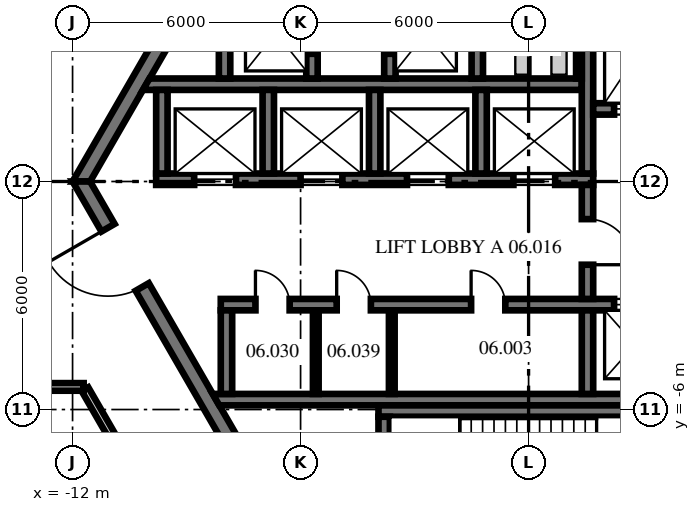
"""IFC4 building model, lengths in metres.
Left out: names, types, materials, properties, quantities, classifications, styles, units other than length and angle.
Written with IfcOpenShell. Run it as: python <this file> out.ifc"""

import sys

from ifc_helpers import new_model, si_unit, direction, frame, frame_2d, origin, place, context, subcontext, project, spatial, polyline, rectangle, outline, extrude, source, transform, mapped, element, fill, save


model = new_model("IFC4")
c1 = context("Model", 3, precision=1e-05, world=origin(), true_north=direction((0.0, 1.0)))
c2 = subcontext(c1, "Body", "Model", "MODEL_VIEW")
j1 = project(units=[si_unit("LENGTHUNIT", "METRE"), si_unit("PLANEANGLEUNIT", "RADIAN")], contexts=[c1])
p1 = place(None, origin())
s1 = spatial("IfcSite", under=j1, at=p1, CompositionType="ELEMENT")
p2 = place(p1, origin())
s2 = spatial("IfcBuilding", under=s1, at=p2, CompositionType="ELEMENT")
p3 = place(p2, frame((0.0, 0.0, 28.9)))
s3 = spatial("IfcBuildingStorey", under=s2, at=p3, CompositionType="ELEMENT", Elevation=28.9)
m1 = source(origin(), c2, "Body", "SweptSolid", [
    extrude(outline(polyline([(-0.115, -0.2), (11.885, -0.2), (11.654, 0.2), (0.115, 0.2), (-0.115, -0.2)])), origin(), (0.0, 0.0, 1.0), 4.1),
])
p4 = place(p3, frame((-5.885, 10.192, 0.0), z_axis=(0.0, 0.0, 1.0), x_axis=(-0.499996592174, -0.866027371285, 0.0)))
e1 = element("IfcWall", 1, at=p4, inside=s3, PredefinedType="SHEAR", context=c2, shape_type="MappedRepresentation", body=[
    mapped(m1, transform((0.0, 0.0, 0.0), scale=1.0)),
])
p5 = place(p4, frame((3.185, 0.0, 0.0)))
e2 = element("IfcOpeningElement", 2, at=p5, cuts=e1, PredefinedType="OPENING", context=c2, shape_type="SweptSolid", body=[
    extrude(rectangle(XDim=1.2, YDim=2.1, at=frame_2d((0.6, 1.05))), frame((0.0, 0.21, 0.0), z_axis=(0.0, -1.0, 0.0), x_axis=(1.0, 0.0, 0.0)), (0.0, 0.0, 1.0), 0.42),
])
p6 = place(p3, frame((-11.769, 0.0, 0.0), z_axis=(0.0, 0.0, 1.0), x_axis=(0.499996592174, -0.866027371285, 0.0)))
e3 = element("IfcWall", 3, at=p6, inside=s3, PredefinedType="SHEAR", context=c2, shape_type="MappedRepresentation", body=[
    mapped(m1, transform((0.0, 0.0, 0.0), scale=1.0)),
])
p7 = place(p6, frame((1.405, 0.0, 0.0)))
e4 = element("IfcOpeningElement", 4, at=p7, cuts=e3, PredefinedType="OPENING", context=c2, shape_type="SweptSolid", body=[
    extrude(rectangle(XDim=1.8, YDim=2.1, at=frame_2d((0.9, 1.05))), frame((0.0, 0.21, 0.0), z_axis=(0.0, -1.0, 0.0), x_axis=(1.0, 0.0, 0.0)), (0.0, 0.0, 1.0), 0.42),
])
p8 = place(p6, frame((7.915, 0.0, 0.0)))
e5 = element("IfcOpeningElement", 5, at=p8, cuts=e3, PredefinedType="OPENING", context=c2, shape_type="SweptSolid", body=[
    extrude(rectangle(XDim=1.2, YDim=2.1, at=frame_2d((0.6, 1.05))), frame((0.0, 0.21, 0.0), z_axis=(0.0, -1.0, 0.0), x_axis=(1.0, 0.0, 0.0)), (0.0, 0.0, 1.0), 0.42),
])
m2 = source(origin(), c2, "Body", "SweptSolid", [
    extrude(rectangle(XDim=11.5, YDim=0.3, at=frame_2d((5.75, 0.0))), origin(), (0.0, 0.0, 1.0), 4.1),
])
p9 = place(p3, frame((-9.8, 0.06, 0.0), z_axis=(0.0, 0.0, 1.0), x_axis=(1.0, 0.0, 0.0)))
e6 = element("IfcWall", 6, at=p9, inside=s3, PredefinedType="SHEAR", context=c2, shape_type="MappedRepresentation", body=[
    mapped(m2, transform((0.0, 0.0, 0.0), scale=1.0)),
])
p10 = place(p9, frame((1.0, 0.0, 0.0)))
e7 = element("IfcOpeningElement", 7, at=p10, cuts=e6, PredefinedType="OPENING", context=c2, shape_type="SweptSolid", body=[
    extrude(rectangle(XDim=1.1, YDim=2.1, at=frame_2d((0.55, 1.05))), frame((0.0, 0.16, 0.0), z_axis=(0.0, -1.0, 0.0), x_axis=(1.0, 0.0, 0.0)), (0.0, 0.0, 1.0), 0.32),
])
p11 = place(p9, frame((3.8, 0.0, 0.0)))
e8 = element("IfcOpeningElement", 8, at=p11, cuts=e6, PredefinedType="OPENING", context=c2, shape_type="SweptSolid", body=[
    extrude(rectangle(XDim=1.1, YDim=2.1, at=frame_2d((0.55, 1.05))), frame((0.0, 0.16, 0.0), z_axis=(0.0, -1.0, 0.0), x_axis=(1.0, 0.0, 0.0)), (0.0, 0.0, 1.0), 0.32),
])
p12 = place(p9, frame((6.6, 0.0, 0.0)))
e9 = element("IfcOpeningElement", 9, at=p12, cuts=e6, PredefinedType="OPENING", context=c2, shape_type="SweptSolid", body=[
    extrude(rectangle(XDim=1.1, YDim=2.1, at=frame_2d((0.55, 1.05))), frame((0.0, 0.16, 0.0), z_axis=(0.0, -1.0, 0.0), x_axis=(1.0, 0.0, 0.0)), (0.0, 0.0, 1.0), 0.32),
])
p13 = place(p9, frame((9.4, 0.0, 0.0)))
e10 = element("IfcOpeningElement", 10, at=p13, cuts=e6, PredefinedType="OPENING", context=c2, shape_type="SweptSolid", body=[
    extrude(rectangle(XDim=1.1, YDim=2.1, at=frame_2d((0.55, 1.05))), frame((0.0, 0.16, 0.0), z_axis=(0.0, -1.0, 0.0), x_axis=(1.0, 0.0, 0.0)), (0.0, 0.0, 1.0), 0.32),
])
m3 = source(origin(), c2, "Body", "SweptSolid", [
    extrude(outline(polyline([(11.2, -0.15), (-0.349, -0.15), (-0.176, 0.15), (11.2, 0.15), (11.2, -0.15)])), origin(), (0.0, 0.0, 1.0), 4.1),
])
p14 = place(p3, frame((-9.8, 2.56, 0.0), z_axis=(0.0, 0.0, 1.0), x_axis=(1.0, 0.0, 0.0)))
e11 = element("IfcWall", 11, at=p14, inside=s3, PredefinedType="SHEAR", context=c2, shape_type="MappedRepresentation", body=[
    mapped(m3, transform((0.0, 0.0, 0.0), scale=1.0)),
])
m4 = source(origin(), c2, "Body", "SweptSolid", [
    extrude(rectangle(XDim=4.45, YDim=0.3, at=frame_2d((2.225, 0.0))), origin(), (0.0, 0.0, 1.0), 4.1),
])
p15 = place(p3, frame((1.55, 0.21, 0.0), z_axis=(0.0, 0.0, 1.0), x_axis=(0.0, 1.0, 0.0)))
e12 = element("IfcWall", 12, at=p15, inside=s3, PredefinedType="SHEAR", context=c2, shape_type="MappedRepresentation", body=[
    mapped(m4, transform((0.0, 0.0, 0.0), scale=1.0)),
])
m5 = source(origin(), c2, "Body", "SweptSolid", [
    extrude(rectangle(XDim=3.0, YDim=0.3, at=frame_2d((1.5, 0.0))), origin(), (0.0, 0.0, 1.0), 4.1),
])
p16 = place(p3, frame((1.7, 1.91, 0.0), z_axis=(0.0, 0.0, 1.0), x_axis=(1.0, 0.0, 0.0)))
e13 = element("IfcWall", 13, at=p16, inside=s3, PredefinedType="SHEAR", context=c2, shape_type="MappedRepresentation", body=[
    mapped(m5, transform((0.0, 0.0, 0.0), scale=1.0)),
])
p17 = place(p16, frame((0.55, 0.0, 0.0)))
e14 = element("IfcOpeningElement", 14, at=p17, cuts=e13, PredefinedType="OPENING", context=c2, shape_type="SweptSolid", body=[
    extrude(rectangle(XDim=1.1, YDim=2.1, at=frame_2d((0.55, 1.05))), frame((0.0, 0.16, 0.0), z_axis=(0.0, -1.0, 0.0), x_axis=(1.0, 0.0, 0.0)), (0.0, 0.0, 1.0), 0.32),
])
m6 = source(origin(), c2, "Body", "SweptSolid", [
    extrude(rectangle(XDim=12.8, YDim=0.3, at=frame_2d((6.4, 0.0))), origin(), (0.0, 0.0, 1.0), 4.1),
])
p18 = place(p3, frame((-8.1, -3.24, 0.0), z_axis=(0.0, 0.0, 1.0), x_axis=(1.0, 0.0, 0.0)))
e15 = element("IfcWall", 15, at=p18, inside=s3, PredefinedType="SHEAR", context=c2, shape_type="MappedRepresentation", body=[
    mapped(m6, transform((0.0, 0.0, 0.0), scale=1.0)),
])
p19 = place(p18, frame((0.913, 0.0, 0.0)))
e16 = element("IfcOpeningElement", 16, at=p19, cuts=e15, PredefinedType="OPENING", context=c2, shape_type="SweptSolid", body=[
    extrude(rectangle(XDim=0.9, YDim=2.1, at=frame_2d((0.45, 1.05))), frame((0.0, 0.16, 0.0), z_axis=(0.0, -1.0, 0.0), x_axis=(1.0, 0.0, 0.0)), (0.0, 0.0, 1.0), 0.32),
])
p20 = place(p18, frame((3.05, 0.0, 0.0)))
e17 = element("IfcOpeningElement", 17, at=p20, cuts=e15, PredefinedType="OPENING", context=c2, shape_type="SweptSolid", body=[
    extrude(rectangle(XDim=0.9, YDim=2.1, at=frame_2d((0.45, 1.05))), frame((0.0, 0.16, 0.0), z_axis=(0.0, -1.0, 0.0), x_axis=(1.0, 0.0, 0.0)), (0.0, 0.0, 1.0), 0.32),
])
p21 = place(p18, frame((6.587, 0.0, 0.0)))
e18 = element("IfcOpeningElement", 18, at=p21, cuts=e15, PredefinedType="OPENING", context=c2, shape_type="SweptSolid", body=[
    extrude(rectangle(XDim=0.9, YDim=2.1, at=frame_2d((0.45, 1.05))), frame((0.0, 0.16, 0.0), z_axis=(0.0, -1.0, 0.0), x_axis=(1.0, 0.0, 0.0)), (0.0, 0.0, 1.0), 0.32),
])
p22 = place(p18, frame((10.35, 0.0, 0.0)))
e19 = element("IfcOpeningElement", 19, at=p22, cuts=e15, PredefinedType="OPENING", context=c2, shape_type="SweptSolid", body=[
    extrude(rectangle(XDim=1.1, YDim=2.1, at=frame_2d((0.55, 1.05))), frame((0.0, 0.16, 0.0), z_axis=(0.0, -1.0, 0.0), x_axis=(1.0, 0.0, 0.0)), (0.0, 0.0, 1.0), 0.32),
])
m7 = source(origin(), c2, "Body", "SweptSolid", [
    extrude(outline(polyline([(12.0, -0.15), (-0.04, -0.15), (-0.213, 0.15), (12.0, 0.15), (12.0, -0.15)])), origin(), (0.0, 0.0, 1.0), 4.1),
])
p23 = place(p3, frame((-8.1, -5.74, 0.0), z_axis=(0.0, 0.0, 1.0), x_axis=(1.0, 0.0, 0.0)))
e20 = element("IfcWall", 20, at=p23, inside=s3, PredefinedType="SHEAR", context=c2, shape_type="MappedRepresentation", body=[
    mapped(m7, transform((0.0, 0.0, 0.0), scale=1.0)),
])
m8 = source(origin(), c2, "Body", "SweptSolid", [
    extrude(rectangle(XDim=2.2, YDim=0.3, at=frame_2d((1.1, 0.0))), origin(), (0.0, 0.0, 1.0), 4.1),
])
p24 = place(p3, frame((-7.95, -5.59, 0.0), z_axis=(0.0, 0.0, 1.0), x_axis=(0.0, 1.0, 0.0)))
e21 = element("IfcWall", 21, at=p24, inside=s3, PredefinedType="SHEAR", context=c2, shape_type="MappedRepresentation", body=[
    mapped(m8, transform((0.0, 0.0, 0.0), scale=1.0)),
])
m9 = source(origin(), c2, "Body", "SweptSolid", [
    extrude(rectangle(XDim=2.2, YDim=0.3, at=frame_2d((1.1, 0.0))), origin(), (0.0, 0.0, 1.0), 4.1),
])
p25 = place(p3, frame((-9.65, 0.21, 0.0), z_axis=(0.0, 0.0, 1.0), x_axis=(0.0, 1.0, 0.0)))
e22 = element("IfcWall", 22, at=p25, inside=s3, PredefinedType="SHEAR", context=c2, shape_type="MappedRepresentation", body=[
    mapped(m9, transform((0.0, 0.0, 0.0), scale=1.0)),
])
p26 = place(p3, frame((1.55, -5.59, 0.0), z_axis=(0.0, 0.0, 1.0), x_axis=(0.0, 1.0, 0.0)))
e23 = element("IfcWall", 23, at=p26, inside=s3, PredefinedType="SHEAR", context=c2, shape_type="MappedRepresentation", body=[
    mapped(m8, transform((0.0, 0.0, 0.0), scale=1.0)),
])
p27 = place(p3, frame((1.55, -3.09, 0.0), z_axis=(0.0, 0.0, 1.0), x_axis=(0.0, 1.0, 0.0)))
e24 = element("IfcWall", 24, at=p27, inside=s3, PredefinedType="SHEAR", context=c2, shape_type="MappedRepresentation", body=[
    mapped(m5, transform((0.0, 0.0, 0.0), scale=1.0)),
])
p28 = place(p27, frame((0.9, 0.0, 0.0)))
e25 = element("IfcOpeningElement", 25, at=p28, cuts=e24, PredefinedType="OPENING", context=c2, shape_type="SweptSolid", body=[
    extrude(rectangle(XDim=1.2, YDim=2.1, at=frame_2d((0.6, 1.05))), frame((0.0, 0.16, 0.0), z_axis=(0.0, -1.0, 0.0), x_axis=(1.0, 0.0, 0.0)), (0.0, 0.0, 1.0), 0.32),
])
m10 = source(origin(), c2, "Body", "SweptSolid", [
    extrude(outline(polyline([(0.0, -0.15), (8.95, -0.15), (8.65, 0.15), (0.0, 0.15), (0.0, -0.15)])), origin(), (0.0, 0.0, 1.0), 4.1),
])
p29 = place(p3, frame((-3.95, -6.04, 0.0), z_axis=(0.0, 0.0, 1.0), x_axis=(1.0, 0.0, 0.0)))
e26 = element("IfcWall", 26, at=p29, inside=s3, PredefinedType="SHEAR", context=c2, shape_type="MappedRepresentation", body=[
    mapped(m10, transform((0.0, 0.0, 0.0), scale=1.0)),
])
m11 = source(origin(), c2, "Body", "SweptSolid", [
    extrude(outline(polyline([(3.8, -0.15), (-0.004, -0.15), (-0.004, 0.15), (3.8, 0.15), (3.8, -0.15)])), origin(), (0.0, 0.0, 1.0), 4.1),
])
p30 = place(p3, frame((-3.8, -9.99, 0.0), z_axis=(0.0, 0.0, 1.0), x_axis=(0.0, 1.0, 0.0)))
e27 = element("IfcWall", 27, at=p30, inside=s3, PredefinedType="SHEAR", context=c2, shape_type="MappedRepresentation", body=[
    mapped(m11, transform((0.0, 0.0, 0.0), scale=1.0)),
])
m12 = source(origin(), c2, "Body", "SweptSolid", [
    extrude(rectangle(XDim=2.4, YDim=0.3, at=frame_2d((1.2, 0.0))), origin(), (0.0, 0.0, 1.0), 4.1),
])
p31 = place(p3, frame((-8.0, 2.71, 0.0), z_axis=(0.0, 0.0, 1.0), x_axis=(0.0, 1.0, 0.0)))
e28 = element("IfcWall", 28, at=p31, inside=s3, PredefinedType="SHEAR", context=c2, shape_type="MappedRepresentation", body=[
    mapped(m12, transform((0.0, 0.0, 0.0), scale=1.0)),
])
p32 = place(p3, frame((-5.7, 2.71, 0.0), z_axis=(0.0, 0.0, 1.0), x_axis=(0.0, 1.0, 0.0)))
e29 = element("IfcWall", 29, at=p32, inside=s3, PredefinedType="SHEAR", context=c2, shape_type="MappedRepresentation", body=[
    mapped(m12, transform((0.0, 0.0, 0.0), scale=1.0)),
])
p33 = place(p32, frame((0.65, 0.0, 0.0)))
e30 = element("IfcOpeningElement", 30, at=p33, cuts=e29, PredefinedType="OPENING", context=c2, shape_type="SweptSolid", body=[
    extrude(rectangle(XDim=1.1, YDim=2.1, at=frame_2d((0.55, 1.05))), frame((0.0, 0.16, 0.0), z_axis=(0.0, -1.0, 0.0), x_axis=(1.0, 0.0, 0.0)), (0.0, 0.0, 1.0), 0.32),
])
p34 = place(p3, frame((-3.65, 2.71, 0.0), z_axis=(0.0, 0.0, 1.0), x_axis=(0.0, 1.0, 0.0)))
e31 = element("IfcWall", 31, at=p34, inside=s3, PredefinedType="SHEAR", context=c2, shape_type="MappedRepresentation", body=[
    mapped(m12, transform((0.0, 0.0, 0.0), scale=1.0)),
])
p35 = place(p34, frame((0.65, 0.0, 0.0)))
e32 = element("IfcOpeningElement", 32, at=p35, cuts=e31, PredefinedType="OPENING", context=c2, shape_type="SweptSolid", body=[
    extrude(rectangle(XDim=1.1, YDim=2.1, at=frame_2d((0.55, 1.05))), frame((0.0, 0.16, 0.0), z_axis=(0.0, -1.0, 0.0), x_axis=(1.0, 0.0, 0.0)), (0.0, 0.0, 1.0), 0.32),
])
p36 = place(p3, frame((-1.35, 2.71, 0.0), z_axis=(0.0, 0.0, 1.0), x_axis=(0.0, 1.0, 0.0)))
e33 = element("IfcWall", 33, at=p36, inside=s3, PredefinedType="SHEAR", context=c2, shape_type="MappedRepresentation", body=[
    mapped(m12, transform((0.0, 0.0, 0.0), scale=1.0)),
])
m13 = source(origin(), c2, "Body", "SweptSolid", [
    extrude(rectangle(XDim=3.18, YDim=0.15, at=frame_2d((1.59, 0.0))), origin(), (0.0, 0.0, 1.0), 4.1),
])
p37 = place(p3, frame((1.325, 2.71, 0.0), z_axis=(0.0, 0.0, 1.0), x_axis=(0.0, 1.0, 0.0)))
e34 = element("IfcWall", 34, at=p37, inside=s3, PredefinedType="PARTITIONING", context=c2, shape_type="MappedRepresentation", body=[
    mapped(m13, transform((0.0, 0.0, 0.0), scale=1.0)),
])
p38 = place(p37, frame((2.265, 0.0, 0.0)))
e35 = element("IfcOpeningElement", 35, at=p38, cuts=e34, PredefinedType="OPENING", context=c2, shape_type="SweptSolid", body=[
    extrude(rectangle(XDim=0.9, YDim=2.1, at=frame_2d((0.45, 1.05))), frame((0.0, 0.085, 0.0), z_axis=(0.0, -1.0, 0.0), x_axis=(1.0, 0.0, 0.0)), (0.0, 0.0, 1.0), 0.17),
])
for number, where, z_axis, x_axis in (
    (36, (-6.85, 0.21, 0.0), (0.0, 0.0, 1.0), (0.0, 1.0, 0.0)),
    (37, (-4.05, 0.21, 0.0), (0.0, 0.0, 1.0), (0.0, 1.0, 0.0)),
    (38, (-1.25, 0.21, 0.0), (0.0, 0.0, 1.0), (0.0, 1.0, 0.0)),
):
    element("IfcWall", number, at=place(p3, frame(where, z_axis=z_axis, x_axis=x_axis)), inside=s3, PredefinedType="SHEAR", context=c2, shape_type="MappedRepresentation", body=[
        mapped(m9, transform((0.0, 0.0, 0.0), scale=1.0)),
    ])
m14 = source(origin(), c2, "Body", "SweptSolid", [
    extrude(rectangle(XDim=2.2, YDim=0.15, at=frame_2d((1.1, 0.0))), origin(), (0.0, 0.0, 1.0), 4.1),
])
for number, where, z_axis, x_axis in (
    (39, (-5.6, -5.59, 0.0), (0.0, 0.0, 1.0), (0.0, 1.0, 0.0)),
    (40, (-3.6, -5.59, 0.0), (0.0, 0.0, 1.0), (0.0, 1.0, 0.0)),
):
    element("IfcWall", number, at=place(p3, frame(where, z_axis=z_axis, x_axis=x_axis)), inside=s3, PredefinedType="PARTITIONING", context=c2, shape_type="MappedRepresentation", body=[
        mapped(m14, transform((0.0, 0.0, 0.0), scale=1.0)),
    ])
m15 = source(origin(), c2, "Body", "SweptSolid", [
    extrude(rectangle(XDim=8.478, YDim=0.2, at=frame_2d((4.239, 0.0))), origin(), (0.0, 0.0, 1.0), 4.1),
])
p39 = place(p3, frame((-11.673, -5.466, 0.0), z_axis=(0.0, 0.0, 1.0), x_axis=(0.499985860718, -0.866033566949, 0.0)))
e41 = element("IfcWall", 41, at=p39, inside=s3, PredefinedType="PARTITIONING", context=c2, shape_type="MappedRepresentation", body=[
    mapped(m15, transform((0.0, 0.0, 0.0), scale=1.0)),
])
m16 = source(origin(), c2, "Body", "SweptSolid", [
    extrude(rectangle(XDim=19.789, YDim=0.2, at=frame_2d((9.895, 0.0))), origin(), (0.0, 0.0, 1.0), 4.1),
])
p40 = place(p3, frame((-31.497, -5.405, 0.0), z_axis=(0.0, 0.0, 1.0), x_axis=(1.0, 0.0, 0.0)))
e42 = element("IfcWall", 42, at=p40, inside=s3, PredefinedType="PARTITIONING", context=c2, shape_type="MappedRepresentation", body=[
    mapped(m16, transform((0.0, 0.0, 0.0), scale=1.0)),
])
p41 = place(p40, frame((9.348, 0.0, 0.0)))
e43 = element("IfcOpeningElement", 43, at=p41, cuts=e42, PredefinedType="OPENING", context=c2, shape_type="SweptSolid", body=[
    extrude(rectangle(XDim=1.0, YDim=2.1, at=frame_2d((0.5, 1.05))), frame((0.0, 0.11, 0.0), z_axis=(0.0, -1.0, 0.0), x_axis=(1.0, 0.0, 0.0)), (0.0, 0.0, 1.0), 0.22),
])
m17 = source(origin(), c2, "Body", "SweptSolid", [
    extrude(rectangle(XDim=14.759, YDim=0.2, at=frame_2d((7.379, 0.0))), origin(), (0.0, 0.0, 1.0), 4.1),
])
p42 = place(p3, frame((-14.794, 0.061, 0.0), z_axis=(0.0, 0.0, 1.0), x_axis=(0.49999260588, 0.86602967274, 0.0)))
e44 = element("IfcWall", 44, at=p42, inside=s3, PredefinedType="PARTITIONING", context=c2, shape_type="MappedRepresentation", body=[
    mapped(m17, transform((0.0, 0.0, 0.0), scale=1.0)),
])
p43 = place(p42, frame((9.109, 0.0, 0.0)))
e45 = element("IfcOpeningElement", 45, at=p43, cuts=e44, PredefinedType="OPENING", context=c2, shape_type="SweptSolid", body=[
    extrude(rectangle(XDim=1.0, YDim=2.1, at=frame_2d((0.5, 1.05))), frame((0.0, 0.11, 0.0), z_axis=(0.0, -1.0, 0.0), x_axis=(1.0, 0.0, 0.0)), (0.0, 0.0, 1.0), 0.22),
])
p44 = place(p7, frame((1.8, 0.0, 0.0), z_axis=(0.0, 0.0, 1.0), x_axis=(-1.0, 0.0, 0.0)))
e46 = element("IfcDoor", 46, at=p44, inside=s3, OperationType="DOUBLE_DOOR_DOUBLE_SWING", PredefinedType="DOOR", context=c2, shape_type="SweptSolid", body=[
    extrude(rectangle(XDim=1.8, YDim=2.1, at=frame_2d((0.9, 1.05))), frame((0.0, 0.025, 0.0), z_axis=(0.0, -1.0, 0.0), x_axis=(1.0, 0.0, 0.0)), (0.0, 0.0, 1.0), 0.05),
])
fill(e4, e46)
p45 = place(p28, frame((1.2, 0.0, 0.0), z_axis=(0.0, 0.0, 1.0), x_axis=(-1.0, 0.0, 0.0)))
e47 = element("IfcDoor", 47, at=p45, inside=s3, OperationType="SINGLE_SWING_RIGHT", PredefinedType="DOOR", context=c2, shape_type="SweptSolid", body=[
    extrude(rectangle(XDim=1.2, YDim=2.1, at=frame_2d((0.6, 1.05))), frame((0.0, 0.025, 0.0), z_axis=(0.0, -1.0, 0.0), x_axis=(1.0, 0.0, 0.0)), (0.0, 0.0, 1.0), 0.05),
])
fill(e25, e47)
p46 = place(p19, origin())
e48 = element("IfcDoor", 48, at=p46, inside=s3, OperationType="SINGLE_SWING_LEFT", PredefinedType="DOOR", context=c2, shape_type="SweptSolid", body=[
    extrude(rectangle(XDim=0.9, YDim=2.1, at=frame_2d((0.45, 1.05))), frame((0.0, 0.025, 0.0), z_axis=(0.0, -1.0, 0.0), x_axis=(1.0, 0.0, 0.0)), (0.0, 0.0, 1.0), 0.05),
])
fill(e16, e48)
p47 = place(p20, origin())
e49 = element("IfcDoor", 49, at=p47, inside=s3, OperationType="SINGLE_SWING_LEFT", PredefinedType="DOOR", context=c2, shape_type="SweptSolid", body=[
    extrude(rectangle(XDim=0.9, YDim=2.1, at=frame_2d((0.45, 1.05))), frame((0.0, 0.025, 0.0), z_axis=(0.0, -1.0, 0.0), x_axis=(1.0, 0.0, 0.0)), (0.0, 0.0, 1.0), 0.05),
])
fill(e17, e49)
p48 = place(p21, origin())
e50 = element("IfcDoor", 50, at=p48, inside=s3, OperationType="SINGLE_SWING_LEFT", PredefinedType="DOOR", context=c2, shape_type="SweptSolid", body=[
    extrude(rectangle(XDim=0.9, YDim=2.1, at=frame_2d((0.45, 1.05))), frame((0.0, 0.025, 0.0), z_axis=(0.0, -1.0, 0.0), x_axis=(1.0, 0.0, 0.0)), (0.0, 0.0, 1.0), 0.05),
])
fill(e18, e50)
p49 = place(p10, origin())
e51 = element("IfcDoor", 51, at=p49, inside=s3, OperationType="DOUBLE_DOOR_SLIDING", PredefinedType="DOOR", context=c2, shape_type="SweptSolid", body=[
    extrude(rectangle(XDim=1.1, YDim=2.1, at=frame_2d((0.55, 1.05))), frame((0.0, 0.025, 0.0), z_axis=(0.0, -1.0, 0.0), x_axis=(1.0, 0.0, 0.0)), (0.0, 0.0, 1.0), 0.05),
])
fill(e7, e51)
p50 = place(p11, origin())
e52 = element("IfcDoor", 52, at=p50, inside=s3, OperationType="DOUBLE_DOOR_SLIDING", PredefinedType="DOOR", context=c2, shape_type="SweptSolid", body=[
    extrude(rectangle(XDim=1.1, YDim=2.1, at=frame_2d((0.55, 1.05))), frame((0.0, 0.025, 0.0), z_axis=(0.0, -1.0, 0.0), x_axis=(1.0, 0.0, 0.0)), (0.0, 0.0, 1.0), 0.05),
])
fill(e8, e52)
p51 = place(p12, origin())
e53 = element("IfcDoor", 53, at=p51, inside=s3, OperationType="DOUBLE_DOOR_SLIDING", PredefinedType="DOOR", context=c2, shape_type="SweptSolid", body=[
    extrude(rectangle(XDim=1.1, YDim=2.1, at=frame_2d((0.55, 1.05))), frame((0.0, 0.025, 0.0), z_axis=(0.0, -1.0, 0.0), x_axis=(1.0, 0.0, 0.0)), (0.0, 0.0, 1.0), 0.05),
])
fill(e9, e53)
p52 = place(p13, origin())
e54 = element("IfcDoor", 54, at=p52, inside=s3, OperationType="DOUBLE_DOOR_SLIDING", PredefinedType="DOOR", context=c2, shape_type="SweptSolid", body=[
    extrude(rectangle(XDim=1.1, YDim=2.1, at=frame_2d((0.55, 1.05))), frame((0.0, 0.025, 0.0), z_axis=(0.0, -1.0, 0.0), x_axis=(1.0, 0.0, 0.0)), (0.0, 0.0, 1.0), 0.05),
])
fill(e10, e54)
p53 = place(p17, origin())
e55 = element("IfcDoor", 55, at=p53, inside=s3, OperationType="DOUBLE_DOOR_SLIDING", PredefinedType="DOOR", context=c2, shape_type="SweptSolid", body=[
    extrude(rectangle(XDim=1.1, YDim=2.1, at=frame_2d((0.55, 1.05))), frame((0.0, 0.025, 0.0), z_axis=(0.0, -1.0, 0.0), x_axis=(1.0, 0.0, 0.0)), (0.0, 0.0, 1.0), 0.05),
])
fill(e14, e55)
p54 = place(p22, origin())
e56 = element("IfcDoor", 56, at=p54, inside=s3, OperationType="DOUBLE_DOOR_SLIDING", PredefinedType="DOOR", context=c2, shape_type="SweptSolid", body=[
    extrude(rectangle(XDim=1.1, YDim=2.1, at=frame_2d((0.55, 1.05))), frame((0.0, 0.025, 0.0), z_axis=(0.0, -1.0, 0.0), x_axis=(1.0, 0.0, 0.0)), (0.0, 0.0, 1.0), 0.05),
])
fill(e19, e56)
p55 = place(p33, origin())
e57 = element("IfcDoor", 57, at=p55, inside=s3, OperationType="DOUBLE_DOOR_SLIDING", PredefinedType="DOOR", context=c2, shape_type="SweptSolid", body=[
    extrude(rectangle(XDim=1.1, YDim=2.1, at=frame_2d((0.55, 1.05))), frame((0.0, 0.025, 0.0), z_axis=(0.0, -1.0, 0.0), x_axis=(1.0, 0.0, 0.0)), (0.0, 0.0, 1.0), 0.05),
])
fill(e30, e57)
p56 = place(p35, origin())
e58 = element("IfcDoor", 58, at=p56, inside=s3, OperationType="DOUBLE_DOOR_SLIDING", PredefinedType="DOOR", context=c2, shape_type="SweptSolid", body=[
    extrude(rectangle(XDim=1.1, YDim=2.1, at=frame_2d((0.55, 1.05))), frame((0.0, 0.025, 0.0), z_axis=(0.0, -1.0, 0.0), x_axis=(1.0, 0.0, 0.0)), (0.0, 0.0, 1.0), 0.05),
])
fill(e32, e58)
save(model, sys.argv[1])
